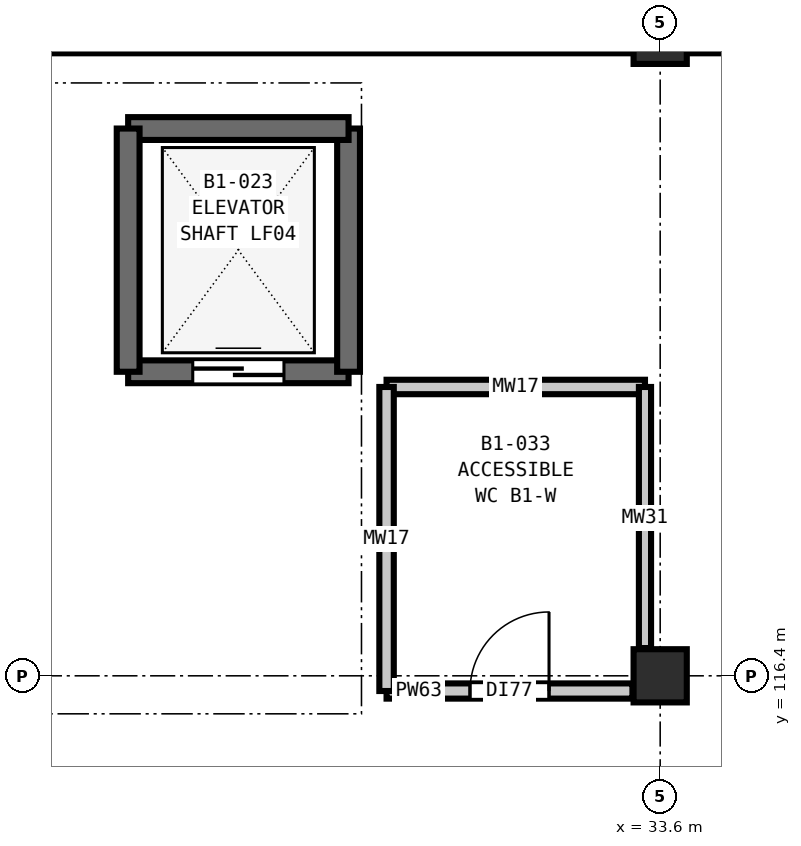
"""IFC4 building model, lengths in metres.
Left out: names, types, materials, properties, quantities, classifications, styles, units other than length and angle.
Written with IfcOpenShell. Run it as: python <this file> out.ifc"""

import sys

from ifc_helpers import new_model, si_unit, direction, frame, frame_2d, origin, origin_2d, place, context, subcontext, project, spatial, rectangle, extrude, element, fill, save


model = new_model("IFC4")
c1 = context("Model", 3, precision=1e-05, world=origin(), true_north=direction((0.0, 1.0)))
c2 = subcontext(c1, "Body", "Model", "MODEL_VIEW")
j1 = project(units=[si_unit("LENGTHUNIT", "METRE"), si_unit("PLANEANGLEUNIT", "RADIAN")], contexts=[c1])
p1 = place(None, origin())
s1 = spatial("IfcSite", under=j1, at=p1, CompositionType="ELEMENT")
p2 = place(p1, origin())
s2 = spatial("IfcBuilding", under=s1, at=p2, CompositionType="ELEMENT")
p3 = place(p2, frame((0.0, 0.0, -4.8)))
s3 = spatial("IfcBuildingStorey", under=s2, at=p3, CompositionType="ELEMENT", Elevation=-4.8)
for number, where, z_axis, x_axis in (
    (1, (33.6, 116.4, 0.0), (0.0, 0.0, 1.0), (1.0, 0.0, 0.0)),
    (2, (33.6, 124.8, 0.0), (0.0, 0.0, 1.0), (1.0, 0.0, 0.0)),
):
    element("IfcColumn", number, at=place(p3, frame(where, z_axis=z_axis, x_axis=x_axis)), inside=s3, PredefinedType="COLUMN", context=c2, shape_type="SweptSolid", body=[
        extrude(rectangle(XDim=0.7, YDim=0.7, at=origin_2d()), origin(), (0.0, 0.0, 1.0), 4.8),
    ])
p4 = place(p3, frame((25.2, 124.8, 0.0), z_axis=(0.0, 0.0, 1.0), x_axis=(1.0, 0.0, 0.0)))
e3 = element("IfcWall", 3, at=p4, inside=s3, PredefinedType="SOLIDWALL", context=c2, shape_type="SweptSolid", body=[
    extrude(rectangle(XDim=8.4, YDim=0.42, at=frame_2d((4.2, 0.0))), origin(), (0.0, 0.0, 1.0), 4.05),
])
p5 = place(p3, frame((33.6, 124.8, 0.0), z_axis=(0.0, 0.0, 1.0), x_axis=(1.0, 0.0, 0.0)))
e4 = element("IfcWall", 4, at=p5, inside=s3, PredefinedType="SOLIDWALL", context=c2, shape_type="SweptSolid", body=[
    extrude(rectangle(XDim=8.4, YDim=0.42, at=frame_2d((4.2, 0.0))), origin(), (0.0, 0.0, 1.0), 4.05),
])
p6 = place(p3, frame((26.6, 120.4, 0.0), z_axis=(0.0, 0.0, 1.0), x_axis=(1.0, 0.0, 0.0)))
e5 = element("IfcWall", 5, at=p6, inside=s3, PredefinedType="SHEAR", context=c2, shape_type="SweptSolid", body=[
    extrude(rectangle(XDim=2.9, YDim=0.3, at=frame_2d((1.45, 0.0))), origin(), (0.0, 0.0, 1.0), 4.8),
])
p7 = place(p6, frame((0.85, 0.0, 0.0)))
e6 = element("IfcOpeningElement", 6, at=p7, cuts=e5, PredefinedType="OPENING", context=c2, shape_type="SweptSolid", body=[
    extrude(rectangle(XDim=1.2, YDim=2.2, at=frame_2d((0.6, 1.1))), frame((0.0, 0.16, 0.0), z_axis=(0.0, -1.0, 0.0), x_axis=(1.0, 0.0, 0.0)), (0.0, 0.0, 1.0), 0.32),
])
p8 = place(p3, frame((29.5, 120.4, 0.0), z_axis=(0.0, 0.0, 1.0), x_axis=(0.0, 1.0, 0.0)))
e7 = element("IfcWall", 7, at=p8, inside=s3, PredefinedType="SHEAR", context=c2, shape_type="SweptSolid", body=[
    extrude(rectangle(XDim=3.2, YDim=0.3, at=frame_2d((1.6, 0.0))), origin(), (0.0, 0.0, 1.0), 4.8),
])
p9 = place(p3, frame((29.5, 123.6, 0.0), z_axis=(0.0, 0.0, 1.0), x_axis=(-1.0, 0.0, 0.0)))
e8 = element("IfcWall", 8, at=p9, inside=s3, PredefinedType="SHEAR", context=c2, shape_type="SweptSolid", body=[
    extrude(rectangle(XDim=2.9, YDim=0.3, at=frame_2d((1.45, 0.0))), origin(), (0.0, 0.0, 1.0), 4.8),
])
p10 = place(p3, frame((26.6, 123.6, 0.0), z_axis=(0.0, 0.0, 1.0), x_axis=(0.0, -1.0, 0.0)))
e9 = element("IfcWall", 9, at=p10, inside=s3, PredefinedType="SHEAR", context=c2, shape_type="SweptSolid", body=[
    extrude(rectangle(XDim=3.2, YDim=0.3, at=frame_2d((1.6, 0.0))), origin(), (0.0, 0.0, 1.0), 4.8),
])
p11 = place(p3, frame((30.0, 116.2, 0.0), z_axis=(0.0, 0.0, 1.0), x_axis=(1.0, 0.0, 0.0)))
e10 = element("IfcWall", 10, at=p11, inside=s3, PredefinedType="PARTITIONING", context=c2, shape_type="SweptSolid", body=[
    extrude(rectangle(XDim=3.235, YDim=0.2, at=frame_2d((1.618, 0.0))), origin(), (0.0, 0.0, 1.0), 3.985),
])
p12 = place(p11, frame((1.097, 0.0, 0.0)))
e11 = element("IfcOpeningElement", 11, at=p12, cuts=e10, PredefinedType="OPENING", context=c2, shape_type="SweptSolid", body=[
    extrude(rectangle(XDim=1.04, YDim=2.1, at=frame_2d((0.52, 1.05))), frame((0.0, 0.11, 0.0), z_axis=(0.0, -1.0, 0.0), x_axis=(1.0, 0.0, 0.0)), (0.0, 0.0, 1.0), 0.22),
])
p13 = place(p3, frame((30.0, 120.2, 0.0), z_axis=(0.0, 0.0, 1.0), x_axis=(1.0, 0.0, 0.0)))
e12 = element("IfcWall", 12, at=p13, inside=s3, PredefinedType="PLUMBINGWALL", context=c2, shape_type="SweptSolid", body=[
    extrude(rectangle(XDim=3.4, YDim=0.19, at=frame_2d((1.7, 0.0))), origin(), (0.0, 0.0, 1.0), 4.44),
])
p14 = place(p3, frame((30.0, 116.2, 0.0), z_axis=(0.0, 0.0, 1.0), x_axis=(0.0, 1.0, 0.0)))
e13 = element("IfcWall", 13, at=p14, inside=s3, PredefinedType="PLUMBINGWALL", context=c2, shape_type="SweptSolid", body=[
    extrude(rectangle(XDim=4.0, YDim=0.19, at=frame_2d((2.0, 0.0))), origin(), (0.0, 0.0, 1.0), 4.44),
])
p15 = place(p3, frame((33.4, 116.765, 0.0), z_axis=(0.0, 0.0, 1.0), x_axis=(0.0, 1.0, 0.0)))
e14 = element("IfcWall", 14, at=p15, inside=s3, PredefinedType="PLUMBINGWALL", context=c2, shape_type="SweptSolid", body=[
    extrude(rectangle(XDim=3.435, YDim=0.16, at=frame_2d((1.718, 0.0))), origin(), (0.0, 0.0, 1.0), 4.085),
])
p16 = place(p7, origin())
e15 = element("IfcDoor", 15, at=p16, inside=s3, OperationType="DOUBLE_DOOR_SLIDING", PredefinedType="DOOR", context=c2, shape_type="SweptSolid", body=[
    extrude(rectangle(XDim=1.2, YDim=2.2, at=frame_2d((0.6, 1.1))), frame((0.0, 0.025, 0.0), z_axis=(0.0, -1.0, 0.0), x_axis=(1.0, 0.0, 0.0)), (0.0, 0.0, 1.0), 0.05),
])
fill(e6, e15)
p17 = place(p12, origin())
e16 = element("IfcDoor", 16, at=p17, inside=s3, OperationType="SINGLE_SWING_RIGHT", PredefinedType="DOOR", context=c2, shape_type="SweptSolid", body=[
    extrude(rectangle(XDim=1.04, YDim=2.1, at=frame_2d((0.52, 1.05))), frame((0.0, 0.025, 0.0), z_axis=(0.0, -1.0, 0.0), x_axis=(1.0, 0.0, 0.0)), (0.0, 0.0, 1.0), 0.05),
])
fill(e11, e16)
save(model, sys.argv[1])
